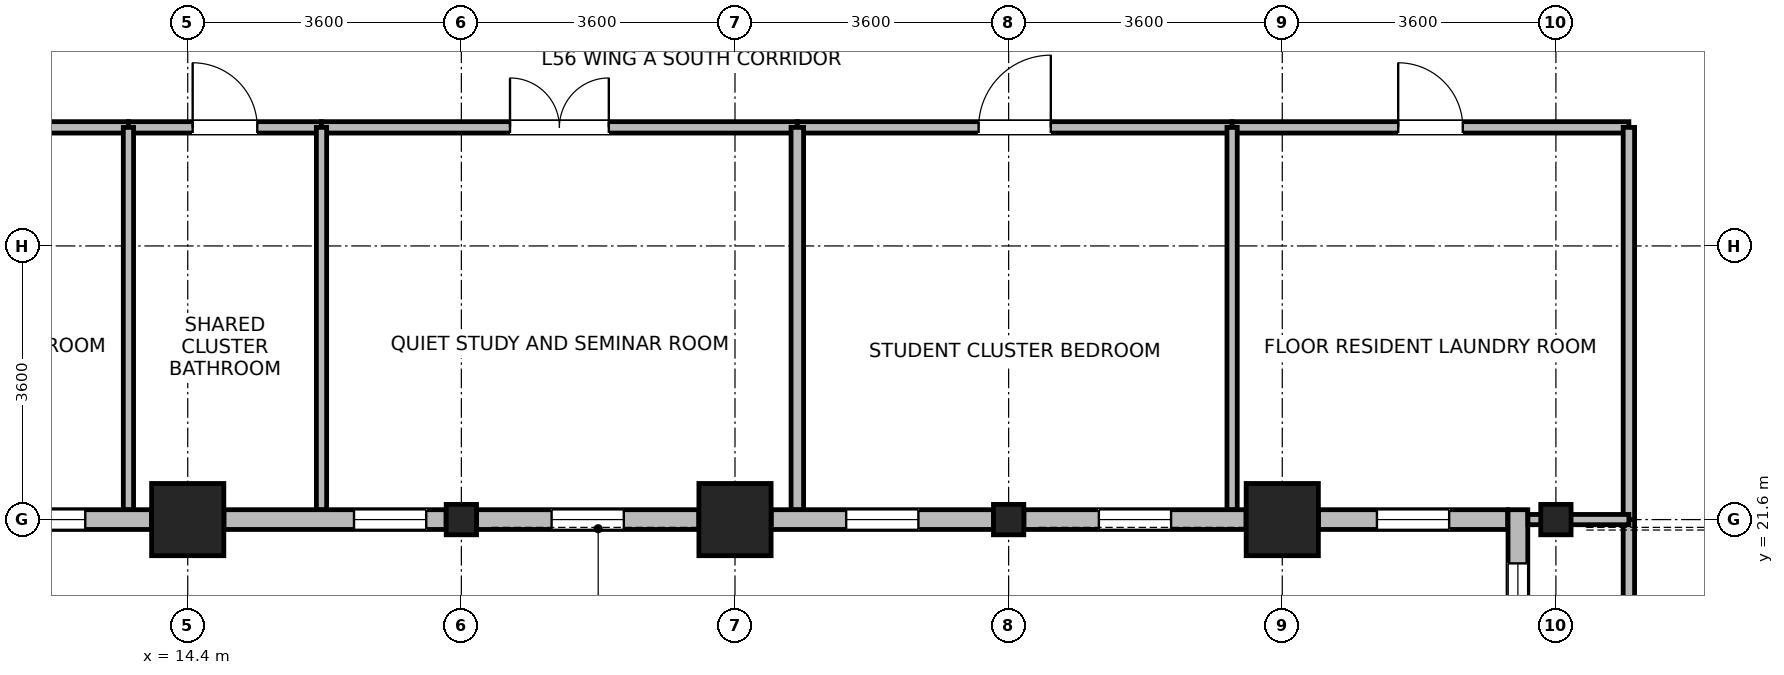
"""IFC4 building model, lengths in metres.
Left out: names, types, materials, properties, quantities, classifications, styles, units other than length and angle.
Written with IfcOpenShell. Run it as: python <this file> out.ifc"""

import sys

from ifc_helpers import new_model, si_unit, direction, frame, frame_2d, origin, origin_2d, place, context, subcontext, project, spatial, rectangle, i_section, extrude, source, transform, mapped, element, fill, save


model = new_model("IFC4")
c1 = context("Model", 3, precision=1e-05, world=origin(), true_north=direction((0.0, 1.0)))
c2 = subcontext(c1, "Body", "Model", "MODEL_VIEW")
j1 = project(units=[si_unit("LENGTHUNIT", "METRE"), si_unit("PLANEANGLEUNIT", "RADIAN")], contexts=[c1])
p1 = place(None, origin())
s1 = spatial("IfcSite", under=j1, at=p1, CompositionType="ELEMENT")
p2 = place(p1, origin())
s2 = spatial("IfcBuilding", under=s1, at=p2, CompositionType="ELEMENT")
p3 = place(p2, frame((0.0, 0.0, 220.3)))
s3 = spatial("IfcBuildingStorey", under=s2, at=p3, CompositionType="ELEMENT", Elevation=220.3)
m1 = source(origin(), c2, "Body", "SweptSolid", [
    extrude(rectangle(XDim=0.95, YDim=0.95, at=origin_2d()), origin(), (0.0, 0.0, 1.0), 3.7),
])
for number, where, z_axis, x_axis in (
    (1, (14.4, 21.6, 0.0), (0.0, 0.0, 1.0), (1.0, 0.0, 0.0)),
    (2, (21.6, 21.6, 0.0), (0.0, 0.0, 1.0), (1.0, 0.0, 0.0)),
    (3, (28.8, 21.6, 0.0), (0.0, 0.0, 1.0), (1.0, 0.0, 0.0)),
):
    element("IfcColumn", number, at=place(p3, frame(where, z_axis=z_axis, x_axis=x_axis)), inside=s3, PredefinedType="COLUMN", context=c2, shape_type="MappedRepresentation", body=[
        mapped(m1, transform((0.0, 0.0, 0.0), x_axis=(1.0, 0.0, 0.0), y_axis=(0.0, 1.0, 0.0), z_axis=(0.0, 0.0, 1.0), scale=1.0)),
    ])
m2 = source(origin(), c2, "Body", "SweptSolid", [
    extrude(i_section(OverallWidth=0.399, OverallDepth=0.4, WebThickness=0.017, FlangeThickness=0.023, FilletRadius=0.015, at=origin_2d()), origin(), (0.0, 0.0, 1.0), 3.7),
])
for number, where, z_axis, x_axis in (
    (4, (18.0, 21.6, 0.0), (0.0, 0.0, 1.0), (1.0, 0.0, 0.0)),
    (5, (25.2, 21.6, 0.0), (0.0, 0.0, 1.0), (1.0, 0.0, 0.0)),
    (6, (32.4, 21.6, 0.0), (0.0, 0.0, 1.0), (1.0, 0.0, 0.0)),
):
    element("IfcColumn", number, at=place(p3, frame(where, z_axis=z_axis, x_axis=x_axis)), inside=s3, PredefinedType="COLUMN", context=c2, shape_type="MappedRepresentation", body=[
        mapped(m2, transform((0.0, 0.0, 0.0), x_axis=(1.0, 0.0, 0.0), y_axis=(0.0, 1.0, 0.0), z_axis=(0.0, 0.0, 1.0), scale=1.0)),
    ])
p4 = place(p3, frame((13.924, 21.6, 0.0), z_axis=(0.0, 0.0, 1.0), x_axis=(-1.0, 0.0, 0.0)))
e7 = element("IfcWall", 7, at=p4, inside=s3, PredefinedType="STANDARD", context=c2, shape_type="SweptSolid", body=[
    extrude(rectangle(XDim=7.089, YDim=0.26, at=frame_2d((3.544, 0.0))), origin(), (0.0, 0.0, 1.0), 3.45),
])
p5 = place(p4, frame((0.872, 0.0, 0.85)))
e8 = element("IfcOpeningElement", 8, at=p5, cuts=e7, PredefinedType="OPENING", context=c2, shape_type="SweptSolid", body=[
    extrude(rectangle(XDim=1.8, YDim=1.85, at=frame_2d((0.9, 0.925))), frame((0.0, 0.14, 0.0), z_axis=(0.0, -1.0, 0.0), x_axis=(1.0, 0.0, 0.0)), (0.0, 0.0, 1.0), 0.28),
])
p6 = place(p4, frame((3.07, 0.0, 0.85)))
e9 = element("IfcOpeningElement", 9, at=p6, cuts=e7, PredefinedType="OPENING", context=c2, shape_type="SweptSolid", body=[
    extrude(rectangle(XDim=0.95, YDim=1.75, at=frame_2d((0.475, 0.875))), frame((0.0, 0.14, 0.0), z_axis=(0.0, -1.0, 0.0), x_axis=(1.0, 0.0, 0.0)), (0.0, 0.0, 1.0), 0.28),
])
p7 = place(p3, frame((17.8, 21.6, 0.0), z_axis=(0.0, 0.0, 1.0), x_axis=(-1.0, 0.0, 0.0)))
e10 = element("IfcWall", 10, at=p7, inside=s3, PredefinedType="STANDARD", context=c2, shape_type="SweptSolid", body=[
    extrude(rectangle(XDim=2.924, YDim=0.26, at=frame_2d((1.462, 0.0))), origin(), (0.0, 0.0, 1.0), 3.05),
])
p8 = place(p7, frame((0.262, 0.0, 0.85)))
e11 = element("IfcOpeningElement", 11, at=p8, cuts=e10, PredefinedType="OPENING", context=c2, shape_type="SweptSolid", body=[
    extrude(rectangle(XDim=0.95, YDim=1.75, at=frame_2d((0.475, 0.875))), frame((0.0, 0.14, 0.0), z_axis=(0.0, -1.0, 0.0), x_axis=(1.0, 0.0, 0.0)), (0.0, 0.0, 1.0), 0.28),
])
p9 = place(p3, frame((21.124, 21.6, 0.0), z_axis=(0.0, 0.0, 1.0), x_axis=(-1.0, 0.0, 0.0)))
e12 = element("IfcWall", 12, at=p9, inside=s3, PredefinedType="STANDARD", context=c2, shape_type="SweptSolid", body=[
    extrude(rectangle(XDim=2.924, YDim=0.26, at=frame_2d((1.462, 0.0))), origin(), (0.0, 0.0, 1.0), 3.05),
])
p10 = place(p9, frame((0.987, 0.0, 0.85)))
e13 = element("IfcOpeningElement", 13, at=p10, cuts=e12, PredefinedType="OPENING", context=c2, shape_type="SweptSolid", body=[
    extrude(rectangle(XDim=0.95, YDim=1.75, at=frame_2d((0.475, 0.875))), frame((0.0, 0.14, 0.0), z_axis=(0.0, -1.0, 0.0), x_axis=(1.0, 0.0, 0.0)), (0.0, 0.0, 1.0), 0.28),
])
p11 = place(p3, frame((25.0, 21.6, 0.0), z_axis=(0.0, 0.0, 1.0), x_axis=(-1.0, 0.0, 0.0)))
e14 = element("IfcWall", 14, at=p11, inside=s3, PredefinedType="STANDARD", context=c2, shape_type="SweptSolid", body=[
    extrude(rectangle(XDim=2.924, YDim=0.26, at=frame_2d((1.462, 0.0))), origin(), (0.0, 0.0, 1.0), 3.05),
])
p12 = place(p11, frame((0.987, 0.0, 0.85)))
e15 = element("IfcOpeningElement", 15, at=p12, cuts=e14, PredefinedType="OPENING", context=c2, shape_type="SweptSolid", body=[
    extrude(rectangle(XDim=0.95, YDim=1.75, at=frame_2d((0.475, 0.875))), frame((0.0, 0.14, 0.0), z_axis=(0.0, -1.0, 0.0), x_axis=(1.0, 0.0, 0.0)), (0.0, 0.0, 1.0), 0.28),
])
p13 = place(p3, frame((28.324, 21.6, 0.0), z_axis=(0.0, 0.0, 1.0), x_axis=(-1.0, 0.0, 0.0)))
e16 = element("IfcWall", 16, at=p13, inside=s3, PredefinedType="STANDARD", context=c2, shape_type="SweptSolid", body=[
    extrude(rectangle(XDim=2.924, YDim=0.26, at=frame_2d((1.462, 0.0))), origin(), (0.0, 0.0, 1.0), 3.05),
])
p14 = place(p13, frame((0.987, 0.0, 0.85)))
e17 = element("IfcOpeningElement", 17, at=p14, cuts=e16, PredefinedType="OPENING", context=c2, shape_type="SweptSolid", body=[
    extrude(rectangle(XDim=0.95, YDim=1.75, at=frame_2d((0.475, 0.875))), frame((0.0, 0.14, 0.0), z_axis=(0.0, -1.0, 0.0), x_axis=(1.0, 0.0, 0.0)), (0.0, 0.0, 1.0), 0.28),
])
p15 = place(p3, frame((31.765, 21.6, 0.0), z_axis=(0.0, 0.0, 1.0), x_axis=(-1.0, 0.0, 0.0)))
e18 = element("IfcWall", 18, at=p15, inside=s3, PredefinedType="STANDARD", context=c2, shape_type="SweptSolid", body=[
    extrude(rectangle(XDim=2.489, YDim=0.26, at=frame_2d((1.245, 0.0))), origin(), (0.0, 0.0, 1.0), 3.05),
])
p16 = place(p15, frame((0.77, 0.0, 0.85)))
e19 = element("IfcOpeningElement", 19, at=p16, cuts=e18, PredefinedType="OPENING", context=c2, shape_type="SweptSolid", body=[
    extrude(rectangle(XDim=0.95, YDim=1.75, at=frame_2d((0.475, 0.875))), frame((0.0, 0.14, 0.0), z_axis=(0.0, -1.0, 0.0), x_axis=(1.0, 0.0, 0.0)), (0.0, 0.0, 1.0), 0.28),
])
p17 = place(p3, frame((31.9, 5.67, 0.0), z_axis=(0.0, 0.0, 1.0), x_axis=(0.0, 1.0, 0.0)))
e20 = element("IfcWall", 20, at=p17, inside=s3, PredefinedType="STANDARD", context=c2, shape_type="SweptSolid", body=[
    extrude(rectangle(XDim=16.06, YDim=0.26, at=frame_2d((8.03, 0.0))), origin(), (0.0, 0.0, 1.0), 3.45),
])
p18 = place(p17, frame((3.918, 0.0, 0.85)))
e21 = element("IfcOpeningElement", 21, at=p18, cuts=e20, PredefinedType="OPENING", context=c2, shape_type="SweptSolid", body=[
    extrude(rectangle(XDim=1.8, YDim=1.85, at=frame_2d((0.9, 0.925))), frame((0.0, 0.14, 0.0), z_axis=(0.0, -1.0, 0.0), x_axis=(1.0, 0.0, 0.0)), (0.0, 0.0, 1.0), 0.28),
])
p19 = place(p17, frame((10.342, 0.0, 0.85)))
e22 = element("IfcOpeningElement", 22, at=p19, cuts=e20, PredefinedType="OPENING", context=c2, shape_type="SweptSolid", body=[
    extrude(rectangle(XDim=1.8, YDim=1.85, at=frame_2d((0.9, 0.925))), frame((0.0, 0.14, 0.0), z_axis=(0.0, -1.0, 0.0), x_axis=(1.0, 0.0, 0.0)), (0.0, 0.0, 1.0), 0.28),
])
p20 = place(p17, frame((13.554, 0.0, 0.85)))
e23 = element("IfcOpeningElement", 23, at=p20, cuts=e20, PredefinedType="OPENING", context=c2, shape_type="SweptSolid", body=[
    extrude(rectangle(XDim=1.8, YDim=1.85, at=frame_2d((0.9, 0.925))), frame((0.0, 0.14, 0.0), z_axis=(0.0, -1.0, 0.0), x_axis=(1.0, 0.0, 0.0)), (0.0, 0.0, 1.0), 0.28),
])
p21 = place(p3, frame((33.36, 14.5, 0.0), z_axis=(0.0, 0.0, 1.0), x_axis=(0.0, 1.0, 0.0)))
e24 = element("IfcWall", 24, at=p21, inside=s3, PredefinedType="PARTITIONING", context=c2, shape_type="SweptSolid", body=[
    extrude(rectangle(XDim=7.1, YDim=0.15, at=frame_2d((3.55, 0.0))), origin(), (0.0, 0.0, 1.0), 3.45),
])
p22 = place(p21, frame((2.9, 0.0, 0.0)))
e25 = element("IfcOpeningElement", 25, at=p22, cuts=e24, PredefinedType="OPENING", context=c2, shape_type="SweptSolid", body=[
    extrude(rectangle(XDim=1.3, YDim=2.12, at=frame_2d((0.65, 1.06))), frame((0.0, 0.085, 0.0), z_axis=(0.0, -1.0, 0.0), x_axis=(1.0, 0.0, 0.0)), (0.0, 0.0, 1.0), 0.17),
])
p23 = place(p3, frame((6.832, 26.76, 0.0), z_axis=(0.0, 0.0, 1.0), x_axis=(1.0, 0.0, 0.0)))
e26 = element("IfcWall", 26, at=p23, inside=s3, PredefinedType="PARTITIONING", context=c2, shape_type="SweptSolid", body=[
    extrude(rectangle(XDim=6.788, YDim=0.15, at=frame_2d((3.394, 0.0))), origin(), (0.0, 0.0, 1.0), 3.45),
])
p24 = place(p23, frame((2.919, 0.0, 0.0)))
e27 = element("IfcOpeningElement", 27, at=p24, cuts=e26, PredefinedType="OPENING", context=c2, shape_type="SweptSolid", body=[
    extrude(rectangle(XDim=0.95, YDim=2.1, at=frame_2d((0.475, 1.05))), frame((0.0, 0.085, 0.0), z_axis=(0.0, -1.0, 0.0), x_axis=(1.0, 0.0, 0.0)), (0.0, 0.0, 1.0), 0.17),
])
p25 = place(p3, frame((16.16, 26.76, 0.0), z_axis=(0.0, 0.0, 1.0), x_axis=(1.0, 0.0, 0.0)))
e28 = element("IfcWall", 28, at=p25, inside=s3, PredefinedType="PARTITIONING", context=c2, shape_type="SweptSolid", body=[
    extrude(rectangle(XDim=6.26, YDim=0.15, at=frame_2d((3.13, 0.0))), origin(), (0.0, 0.0, 1.0), 3.45),
])
p26 = place(p25, frame((2.48, 0.0, 0.0)))
e29 = element("IfcOpeningElement", 29, at=p26, cuts=e28, PredefinedType="OPENING", context=c2, shape_type="SweptSolid", body=[
    extrude(rectangle(XDim=1.3, YDim=2.12, at=frame_2d((0.65, 1.06))), frame((0.0, 0.085, 0.0), z_axis=(0.0, -1.0, 0.0), x_axis=(1.0, 0.0, 0.0)), (0.0, 0.0, 1.0), 0.17),
])
p27 = place(p3, frame((22.42, 26.76, 0.0), z_axis=(0.0, 0.0, 1.0), x_axis=(1.0, 0.0, 0.0)))
e30 = element("IfcWall", 30, at=p27, inside=s3, PredefinedType="PARTITIONING", context=c2, shape_type="SweptSolid", body=[
    extrude(rectangle(XDim=5.72, YDim=0.15, at=frame_2d((2.86, 0.0))), origin(), (0.0, 0.0, 1.0), 3.45),
])
p28 = place(p27, frame((2.385, 0.0, 0.0)))
e31 = element("IfcOpeningElement", 31, at=p28, cuts=e30, PredefinedType="OPENING", context=c2, shape_type="SweptSolid", body=[
    extrude(rectangle(XDim=0.95, YDim=2.1, at=frame_2d((0.475, 1.05))), frame((0.0, 0.085, 0.0), z_axis=(0.0, -1.0, 0.0), x_axis=(1.0, 0.0, 0.0)), (0.0, 0.0, 1.0), 0.17),
])
p29 = place(p3, frame((28.14, 26.76, 0.0), z_axis=(0.0, 0.0, 1.0), x_axis=(1.0, 0.0, 0.0)))
e32 = element("IfcWall", 32, at=p29, inside=s3, PredefinedType="PARTITIONING", context=c2, shape_type="SweptSolid", body=[
    extrude(rectangle(XDim=5.22, YDim=0.15, at=frame_2d((2.61, 0.0))), origin(), (0.0, 0.0, 1.0), 3.45),
])
p30 = place(p29, frame((2.185, 0.0, 0.0)))
e33 = element("IfcOpeningElement", 33, at=p30, cuts=e32, PredefinedType="OPENING", context=c2, shape_type="SweptSolid", body=[
    extrude(rectangle(XDim=0.85, YDim=2.04, at=frame_2d((0.425, 1.02))), frame((0.0, 0.085, 0.0), z_axis=(0.0, -1.0, 0.0), x_axis=(1.0, 0.0, 0.0)), (0.0, 0.0, 1.0), 0.17),
])
p31 = place(p3, frame((33.36, 21.6, 0.0), z_axis=(0.0, 0.0, 1.0), x_axis=(0.0, 1.0, 0.0)))
e34 = element("IfcWall", 34, at=p31, inside=s3, PredefinedType="PARTITIONING", context=c2, shape_type="SweptSolid", body=[
    extrude(rectangle(XDim=5.16, YDim=0.15, at=frame_2d((2.58, 0.0))), origin(), (0.0, 0.0, 1.0), 3.45),
])
p32 = place(p3, frame((13.62, 26.76, 0.0), z_axis=(0.0, 0.0, 1.0), x_axis=(1.0, 0.0, 0.0)))
e35 = element("IfcWall", 35, at=p32, inside=s3, PredefinedType="PARTITIONING", context=c2, shape_type="SweptSolid", body=[
    extrude(rectangle(XDim=2.54, YDim=0.15, at=frame_2d((1.27, 0.0))), origin(), (0.0, 0.0, 1.0), 3.45),
])
p33 = place(p32, frame((0.845, 0.0, 0.0)))
e36 = element("IfcOpeningElement", 36, at=p33, cuts=e35, PredefinedType="OPENING", context=c2, shape_type="SweptSolid", body=[
    extrude(rectangle(XDim=0.85, YDim=2.04, at=frame_2d((0.425, 1.02))), frame((0.0, 0.085, 0.0), z_axis=(0.0, -1.0, 0.0), x_axis=(1.0, 0.0, 0.0)), (0.0, 0.0, 1.0), 0.17),
])
for number, where, z_axis, x_axis in (
    (37, (13.62, 21.732, 0.0), (0.0, 0.0, 1.0), (0.0, 1.0, 0.0)),
    (38, (16.16, 21.732, 0.0), (0.0, 0.0, 1.0), (0.0, 1.0, 0.0)),
):
    element("IfcWall", number, at=place(p3, frame(where, z_axis=z_axis, x_axis=x_axis)), inside=s3, PredefinedType="PARTITIONING", context=c2, shape_type="SweptSolid", body=[
        extrude(rectangle(XDim=5.028, YDim=0.135, at=frame_2d((2.514, 0.0))), origin(), (0.0, 0.0, 1.0), 3.45),
    ])
p34 = place(p3, frame((22.42, 21.732, 0.0), z_axis=(0.0, 0.0, 1.0), x_axis=(0.0, 1.0, 0.0)))
e39 = element("IfcWall", 39, at=p34, inside=s3, PredefinedType="PARTITIONING", context=c2, shape_type="SweptSolid", body=[
    extrude(rectangle(XDim=5.028, YDim=0.165, at=frame_2d((2.514, 0.0))), origin(), (0.0, 0.0, 1.0), 3.45),
])
p35 = place(p3, frame((28.14, 21.732, 0.0), z_axis=(0.0, 0.0, 1.0), x_axis=(0.0, 1.0, 0.0)))
e40 = element("IfcWall", 40, at=p35, inside=s3, PredefinedType="PARTITIONING", context=c2, shape_type="SweptSolid", body=[
    extrude(rectangle(XDim=5.028, YDim=0.135, at=frame_2d((2.514, 0.0))), origin(), (0.0, 0.0, 1.0), 3.45),
])
p36 = place(p3, frame((32.032, 21.6, 0.0), z_axis=(0.0, 0.0, 1.0), x_axis=(1.0, 0.0, 0.0)))
e41 = element("IfcWall", 41, at=p36, inside=s3, PredefinedType="PARTITIONING", context=c2, shape_type="SweptSolid", body=[
    extrude(rectangle(XDim=1.328, YDim=0.135, at=frame_2d((0.664, 0.0))), origin(), (0.0, 0.0, 1.0), 3.05),
])
p37 = place(p5, origin())
e42 = element("IfcWindow", 42, at=p37, inside=s3, PartitioningType="SINGLE_PANEL", PredefinedType="WINDOW", context=c2, shape_type="SweptSolid", body=[
    extrude(rectangle(XDim=1.8, YDim=1.85, at=frame_2d((0.9, 0.925))), frame((0.0, 0.03, 0.0), z_axis=(0.0, -1.0, 0.0), x_axis=(1.0, 0.0, 0.0)), (0.0, 0.0, 1.0), 0.06),
])
fill(e8, e42)
p38 = place(p8, origin())
e43 = element("IfcWindow", 43, at=p38, inside=s3, PartitioningType="SINGLE_PANEL", PredefinedType="WINDOW", context=c2, shape_type="SweptSolid", body=[
    extrude(rectangle(XDim=0.95, YDim=1.75, at=frame_2d((0.475, 0.875))), frame((0.0, 0.03, 0.0), z_axis=(0.0, -1.0, 0.0), x_axis=(1.0, 0.0, 0.0)), (0.0, 0.0, 1.0), 0.06),
])
fill(e11, e43)
p39 = place(p10, origin())
e44 = element("IfcWindow", 44, at=p39, inside=s3, PartitioningType="SINGLE_PANEL", PredefinedType="WINDOW", context=c2, shape_type="SweptSolid", body=[
    extrude(rectangle(XDim=0.95, YDim=1.75, at=frame_2d((0.475, 0.875))), frame((0.0, 0.03, 0.0), z_axis=(0.0, -1.0, 0.0), x_axis=(1.0, 0.0, 0.0)), (0.0, 0.0, 1.0), 0.06),
])
fill(e13, e44)
p40 = place(p12, origin())
e45 = element("IfcWindow", 45, at=p40, inside=s3, PartitioningType="SINGLE_PANEL", PredefinedType="WINDOW", context=c2, shape_type="SweptSolid", body=[
    extrude(rectangle(XDim=0.95, YDim=1.75, at=frame_2d((0.475, 0.875))), frame((0.0, 0.03, 0.0), z_axis=(0.0, -1.0, 0.0), x_axis=(1.0, 0.0, 0.0)), (0.0, 0.0, 1.0), 0.06),
])
fill(e15, e45)
p41 = place(p14, origin())
e46 = element("IfcWindow", 46, at=p41, inside=s3, PartitioningType="SINGLE_PANEL", PredefinedType="WINDOW", context=c2, shape_type="SweptSolid", body=[
    extrude(rectangle(XDim=0.95, YDim=1.75, at=frame_2d((0.475, 0.875))), frame((0.0, 0.03, 0.0), z_axis=(0.0, -1.0, 0.0), x_axis=(1.0, 0.0, 0.0)), (0.0, 0.0, 1.0), 0.06),
])
fill(e17, e46)
p42 = place(p16, origin())
e47 = element("IfcWindow", 47, at=p42, inside=s3, PartitioningType="SINGLE_PANEL", PredefinedType="WINDOW", context=c2, shape_type="SweptSolid", body=[
    extrude(rectangle(XDim=0.95, YDim=1.75, at=frame_2d((0.475, 0.875))), frame((0.0, 0.03, 0.0), z_axis=(0.0, -1.0, 0.0), x_axis=(1.0, 0.0, 0.0)), (0.0, 0.0, 1.0), 0.06),
])
fill(e19, e47)
p43 = place(p20, origin())
e48 = element("IfcWindow", 48, at=p43, inside=s3, PartitioningType="SINGLE_PANEL", PredefinedType="WINDOW", context=c2, shape_type="SweptSolid", body=[
    extrude(rectangle(XDim=1.8, YDim=1.85, at=frame_2d((0.9, 0.925))), frame((0.0, 0.03, 0.0), z_axis=(0.0, -1.0, 0.0), x_axis=(1.0, 0.0, 0.0)), (0.0, 0.0, 1.0), 0.06),
])
fill(e23, e48)
p44 = place(p26, origin())
e49 = element("IfcDoor", 49, at=p44, inside=s3, OperationType="DOUBLE_DOOR_SINGLE_SWING", PredefinedType="DOOR", context=c2, shape_type="SweptSolid", body=[
    extrude(rectangle(XDim=1.3, YDim=2.12, at=frame_2d((0.65, 1.06))), frame((0.0, 0.025, 0.0), z_axis=(0.0, -1.0, 0.0), x_axis=(1.0, 0.0, 0.0)), (0.0, 0.0, 1.0), 0.05),
])
fill(e29, e49)
p45 = place(p28, origin())
e50 = element("IfcDoor", 50, at=p45, inside=s3, OperationType="SINGLE_SWING_RIGHT", PredefinedType="DOOR", context=c2, shape_type="SweptSolid", body=[
    extrude(rectangle(XDim=0.95, YDim=2.1, at=frame_2d((0.475, 1.05))), frame((0.0, 0.025, 0.0), z_axis=(0.0, -1.0, 0.0), x_axis=(1.0, 0.0, 0.0)), (0.0, 0.0, 1.0), 0.05),
])
fill(e31, e50)
p46 = place(p30, origin())
e51 = element("IfcDoor", 51, at=p46, inside=s3, OperationType="SINGLE_SWING_LEFT", PredefinedType="DOOR", context=c2, shape_type="SweptSolid", body=[
    extrude(rectangle(XDim=0.85, YDim=2.04, at=frame_2d((0.425, 1.02))), frame((0.0, 0.025, 0.0), z_axis=(0.0, -1.0, 0.0), x_axis=(1.0, 0.0, 0.0)), (0.0, 0.0, 1.0), 0.05),
])
fill(e33, e51)
p47 = place(p33, origin())
e52 = element("IfcDoor", 52, at=p47, inside=s3, OperationType="SINGLE_SWING_LEFT", PredefinedType="DOOR", context=c2, shape_type="SweptSolid", body=[
    extrude(rectangle(XDim=0.85, YDim=2.04, at=frame_2d((0.425, 1.02))), frame((0.0, 0.025, 0.0), z_axis=(0.0, -1.0, 0.0), x_axis=(1.0, 0.0, 0.0)), (0.0, 0.0, 1.0), 0.05),
])
fill(e36, e52)
save(model, sys.argv[1])
